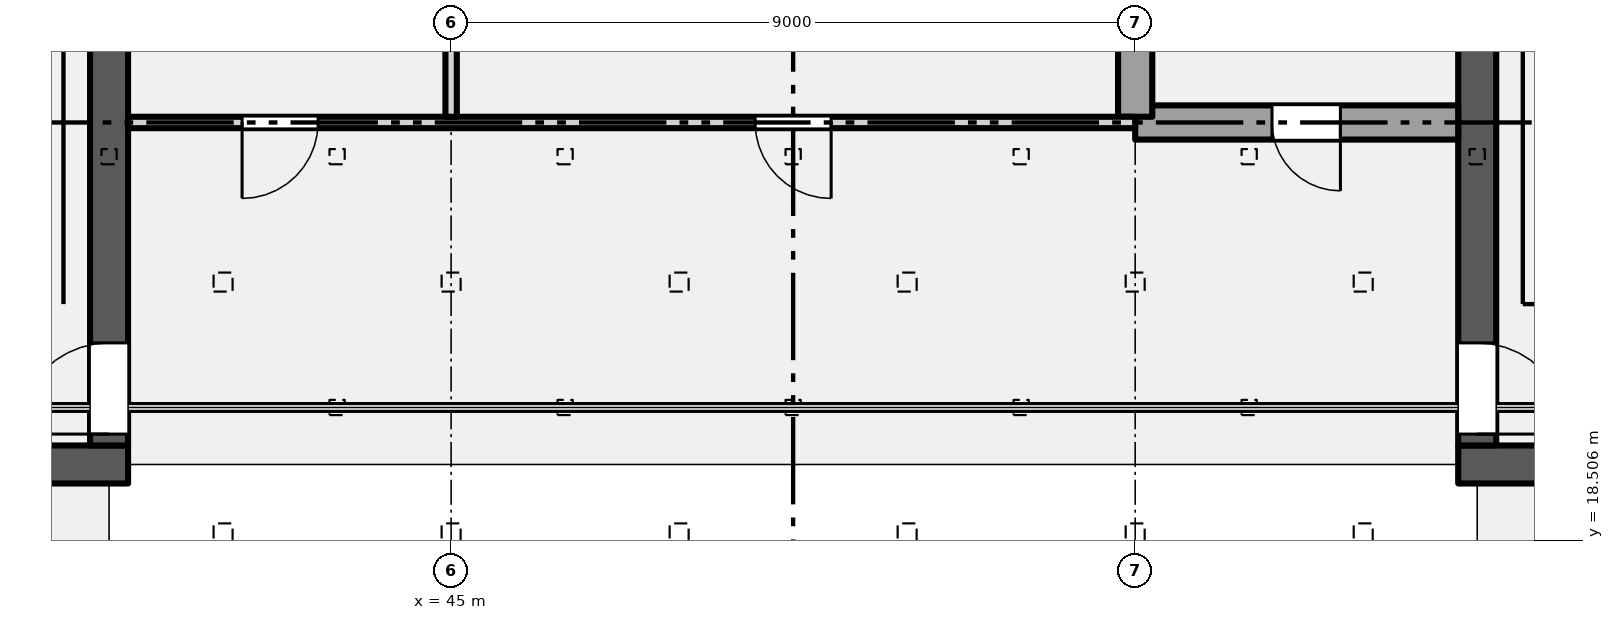
"""IFC4 building model, lengths in metres.
Left out: names, types, materials, properties, quantities, classifications, styles, units other than length and angle.
Written with IfcOpenShell. Run it as: python <this file> out.ifc"""

import sys

from ifc_helpers import new_model, si_unit, direction, frame, frame_2d, origin, place, context, subcontext, project, spatial, rectangle, extrude, element, fill, save


model = new_model("IFC4")
c1 = context("Model", 3, precision=1e-05, world=origin(), true_north=direction((0.0, 1.0)))
c2 = subcontext(c1, "Body", "Model", "MODEL_VIEW")
j1 = project(units=[si_unit("LENGTHUNIT", "METRE"), si_unit("PLANEANGLEUNIT", "RADIAN")], contexts=[c1])
p1 = place(None, origin())
s1 = spatial("IfcSite", under=j1, at=p1, CompositionType="ELEMENT")
p2 = place(p1, origin())
s2 = spatial("IfcBuilding", under=s1, at=p2, CompositionType="ELEMENT")
p3 = place(p2, frame((0.0, 0.0, 12.0)))
s3 = spatial("IfcBuildingStorey", under=s2, at=p3, CompositionType="ELEMENT", Elevation=12.0)
p4 = place(p3, frame((35.75, 19.5, 0.0), z_axis=(0.0, 0.0, 1.0), x_axis=(1.0, 0.0, 0.0)))
e1 = element("IfcWall", 1, at=p4, inside=s3, PredefinedType="SHEAR", context=c2, shape_type="SweptSolid", body=[
    extrude(rectangle(XDim=5.0, YDim=0.5, at=frame_2d((2.5, 0.0))), origin(), (0.0, 0.0, 1.0), 5.4),
])
p5 = place(p4, frame((1.9, 0.0, 0.0)))
e2 = element("IfcOpeningElement", 2, at=p5, cuts=e1, PredefinedType="OPENING", context=c2, shape_type="SweptSolid", body=[
    extrude(rectangle(XDim=1.2, YDim=2.1, at=frame_2d((0.6, 1.05))), frame((0.0, 0.26, 0.0), z_axis=(0.0, -1.0, 0.0), x_axis=(1.0, 0.0, 0.0)), (0.0, 0.0, 1.0), 0.52),
])
p6 = place(p3, frame((58.25, 19.5, 0.0), z_axis=(0.0, 0.0, 1.0), x_axis=(1.0, 0.0, 0.0)))
e3 = element("IfcWall", 3, at=p6, inside=s3, PredefinedType="SHEAR", context=c2, shape_type="SweptSolid", body=[
    extrude(rectangle(XDim=5.0, YDim=0.5, at=frame_2d((2.5, 0.0))), origin(), (0.0, 0.0, 1.0), 5.4),
])
p7 = place(p6, frame((1.9, 0.0, 0.0)))
e4 = element("IfcOpeningElement", 4, at=p7, cuts=e3, PredefinedType="OPENING", context=c2, shape_type="SweptSolid", body=[
    extrude(rectangle(XDim=1.2, YDim=2.1, at=frame_2d((0.6, 1.05))), frame((0.0, 0.26, 0.0), z_axis=(0.0, -1.0, 0.0), x_axis=(1.0, 0.0, 0.0)), (0.0, 0.0, 1.0), 0.52),
])
p8 = place(p3, frame((40.5, 19.75, 0.0), z_axis=(0.0, 0.0, 1.0), x_axis=(0.0, 1.0, 0.0)))
e5 = element("IfcWall", 5, at=p8, inside=s3, PredefinedType="SHEAR", context=c2, shape_type="SweptSolid", body=[
    extrude(rectangle(XDim=8.5, YDim=0.5, at=frame_2d((4.25, 0.0))), origin(), (0.0, 0.0, 1.0), 5.4),
])
p9 = place(p8, frame((0.15, 0.0, 0.0)))
e6 = element("IfcOpeningElement", 6, at=p9, cuts=e5, PredefinedType="OPENING", context=c2, shape_type="SweptSolid", body=[
    extrude(rectangle(XDim=1.2, YDim=2.1, at=frame_2d((0.6, 1.05))), frame((0.0, 0.26, 0.0), z_axis=(0.0, -1.0, 0.0), x_axis=(1.0, 0.0, 0.0)), (0.0, 0.0, 1.0), 0.52),
])
p10 = place(p3, frame((58.5, 19.75, 0.0), z_axis=(0.0, 0.0, 1.0), x_axis=(0.0, 1.0, 0.0)))
e7 = element("IfcWall", 7, at=p10, inside=s3, PredefinedType="SHEAR", context=c2, shape_type="SweptSolid", body=[
    extrude(rectangle(XDim=8.5, YDim=0.5, at=frame_2d((4.25, 0.0))), origin(), (0.0, 0.0, 1.0), 5.4),
])
p11 = place(p10, frame((1.35, 0.0, 0.0), z_axis=(0.0, 0.0, 1.0), x_axis=(-1.0, 0.0, 0.0)))
e8 = element("IfcOpeningElement", 8, at=p11, cuts=e7, PredefinedType="OPENING", context=c2, shape_type="SweptSolid", body=[
    extrude(rectangle(XDim=1.2, YDim=2.1, at=frame_2d((0.6, 1.05))), frame((0.0, 0.26, 0.0), z_axis=(0.0, -1.0, 0.0), x_axis=(1.0, 0.0, 0.0)), (0.0, 0.0, 1.0), 0.52),
])
p12 = place(p3, frame((40.75, 24.0, 0.0), z_axis=(0.0, 0.0, 1.0), x_axis=(1.0, 0.0, 0.0)))
e9 = element("IfcWall", 9, at=p12, inside=s3, PredefinedType="PARTITIONING", context=c2, shape_type="SweptSolid", body=[
    extrude(rectangle(XDim=13.25, YDim=0.15, at=frame_2d((6.625, 0.0))), origin(), (0.0, 0.0, 1.0), 5.4),
])
p13 = place(p12, frame((2.5, 0.0, 0.0), z_axis=(0.0, 0.0, 1.0), x_axis=(-1.0, 0.0, 0.0)))
e10 = element("IfcOpeningElement", 10, at=p13, cuts=e9, PredefinedType="OPENING", context=c2, shape_type="SweptSolid", body=[
    extrude(rectangle(XDim=1.0, YDim=2.4, at=frame_2d((0.5, 1.2))), frame((0.0, 0.085, 0.0), z_axis=(0.0, -1.0, 0.0), x_axis=(1.0, 0.0, 0.0)), (0.0, 0.0, 1.0), 0.17),
])
p14 = place(p12, frame((9.25, 0.0, 0.0), z_axis=(0.0, 0.0, 1.0), x_axis=(-1.0, 0.0, 0.0)))
e11 = element("IfcOpeningElement", 11, at=p14, cuts=e9, PredefinedType="OPENING", context=c2, shape_type="SweptSolid", body=[
    extrude(rectangle(XDim=1.0, YDim=2.4, at=frame_2d((0.5, 1.2))), frame((0.0, 0.085, 0.0), z_axis=(0.0, -1.0, 0.0), x_axis=(1.0, 0.0, 0.0)), (0.0, 0.0, 1.0), 0.17),
])
p15 = place(p3, frame((54.0, 24.0, 0.0), z_axis=(0.0, 0.0, 1.0), x_axis=(1.0, 0.0, 0.0)))
e12 = element("IfcWall", 12, at=p15, inside=s3, PredefinedType="PARTITIONING", context=c2, shape_type="SweptSolid", body=[
    extrude(rectangle(XDim=4.25, YDim=0.45, at=frame_2d((2.125, 0.0))), origin(), (0.0, 0.0, 1.0), 5.4),
])
p16 = place(p15, frame((2.7, 0.0, 0.0), z_axis=(0.0, 0.0, 1.0), x_axis=(-1.0, 0.0, 0.0)))
e13 = element("IfcOpeningElement", 13, at=p16, cuts=e12, PredefinedType="OPENING", context=c2, shape_type="SweptSolid", body=[
    extrude(rectangle(XDim=0.9, YDim=2.4, at=frame_2d((0.45, 1.2))), frame((0.0, 0.235, 0.0), z_axis=(0.0, -1.0, 0.0), x_axis=(1.0, 0.0, 0.0)), (0.0, 0.0, 1.0), 0.47),
])
p17 = place(p3, frame((45.0, 24.075, 0.0), z_axis=(0.0, 0.0, 1.0), x_axis=(0.0, 1.0, 0.0)))
e14 = element("IfcWall", 14, at=p17, inside=s3, PredefinedType="PARTITIONING", context=c2, shape_type="SweptSolid", body=[
    extrude(rectangle(XDim=3.875, YDim=0.15, at=frame_2d((1.938, 0.0))), origin(), (0.0, 0.0, 1.0), 5.4),
])
p18 = place(p3, frame((54.0, 24.075, 0.0), z_axis=(0.0, 0.0, 1.0), x_axis=(0.0, 1.0, 0.0)))
e15 = element("IfcWall", 15, at=p18, inside=s3, PredefinedType="PARTITIONING", context=c2, shape_type="SweptSolid", body=[
    extrude(rectangle(XDim=3.875, YDim=0.45, at=frame_2d((1.938, 0.0))), origin(), (0.0, 0.0, 1.0), 5.4),
])
p19 = place(p9, origin())
e16 = element("IfcDoor", 16, at=p19, inside=s3, OperationType="SINGLE_SWING_LEFT", PredefinedType="DOOR", context=c2, shape_type="SweptSolid", body=[
    extrude(rectangle(XDim=1.2, YDim=2.1, at=frame_2d((0.6, 1.05))), frame((0.0, 0.025, 0.0), z_axis=(0.0, -1.0, 0.0), x_axis=(1.0, 0.0, 0.0)), (0.0, 0.0, 1.0), 0.05),
])
fill(e6, e16)
p20 = place(p11, origin())
e17 = element("IfcDoor", 17, at=p20, inside=s3, OperationType="SINGLE_SWING_RIGHT", PredefinedType="DOOR", context=c2, shape_type="SweptSolid", body=[
    extrude(rectangle(XDim=1.2, YDim=2.1, at=frame_2d((0.6, 1.05))), frame((0.0, 0.025, 0.0), z_axis=(0.0, -1.0, 0.0), x_axis=(1.0, 0.0, 0.0)), (0.0, 0.0, 1.0), 0.05),
])
fill(e8, e17)
p21 = place(p13, origin())
e18 = element("IfcDoor", 18, at=p21, inside=s3, OperationType="SINGLE_SWING_RIGHT", PredefinedType="DOOR", context=c2, shape_type="SweptSolid", body=[
    extrude(rectangle(XDim=1.0, YDim=2.4, at=frame_2d((0.5, 1.2))), frame((0.0, 0.025, 0.0), z_axis=(0.0, -1.0, 0.0), x_axis=(1.0, 0.0, 0.0)), (0.0, 0.0, 1.0), 0.05),
])
fill(e10, e18)
p22 = place(p14, origin())
e19 = element("IfcDoor", 19, at=p22, inside=s3, OperationType="SINGLE_SWING_LEFT", PredefinedType="DOOR", context=c2, shape_type="SweptSolid", body=[
    extrude(rectangle(XDim=1.0, YDim=2.4, at=frame_2d((0.5, 1.2))), frame((0.0, 0.025, 0.0), z_axis=(0.0, -1.0, 0.0), x_axis=(1.0, 0.0, 0.0)), (0.0, 0.0, 1.0), 0.05),
])
fill(e11, e19)
p23 = place(p16, origin())
e20 = element("IfcDoor", 20, at=p23, inside=s3, OperationType="SINGLE_SWING_LEFT", PredefinedType="DOOR", context=c2, shape_type="SweptSolid", body=[
    extrude(rectangle(XDim=0.9, YDim=2.4, at=frame_2d((0.45, 1.2))), frame((0.0, 0.025, 0.0), z_axis=(0.0, -1.0, 0.0), x_axis=(1.0, 0.0, 0.0)), (0.0, 0.0, 1.0), 0.05),
])
fill(e13, e20)
save(model, sys.argv[1])
